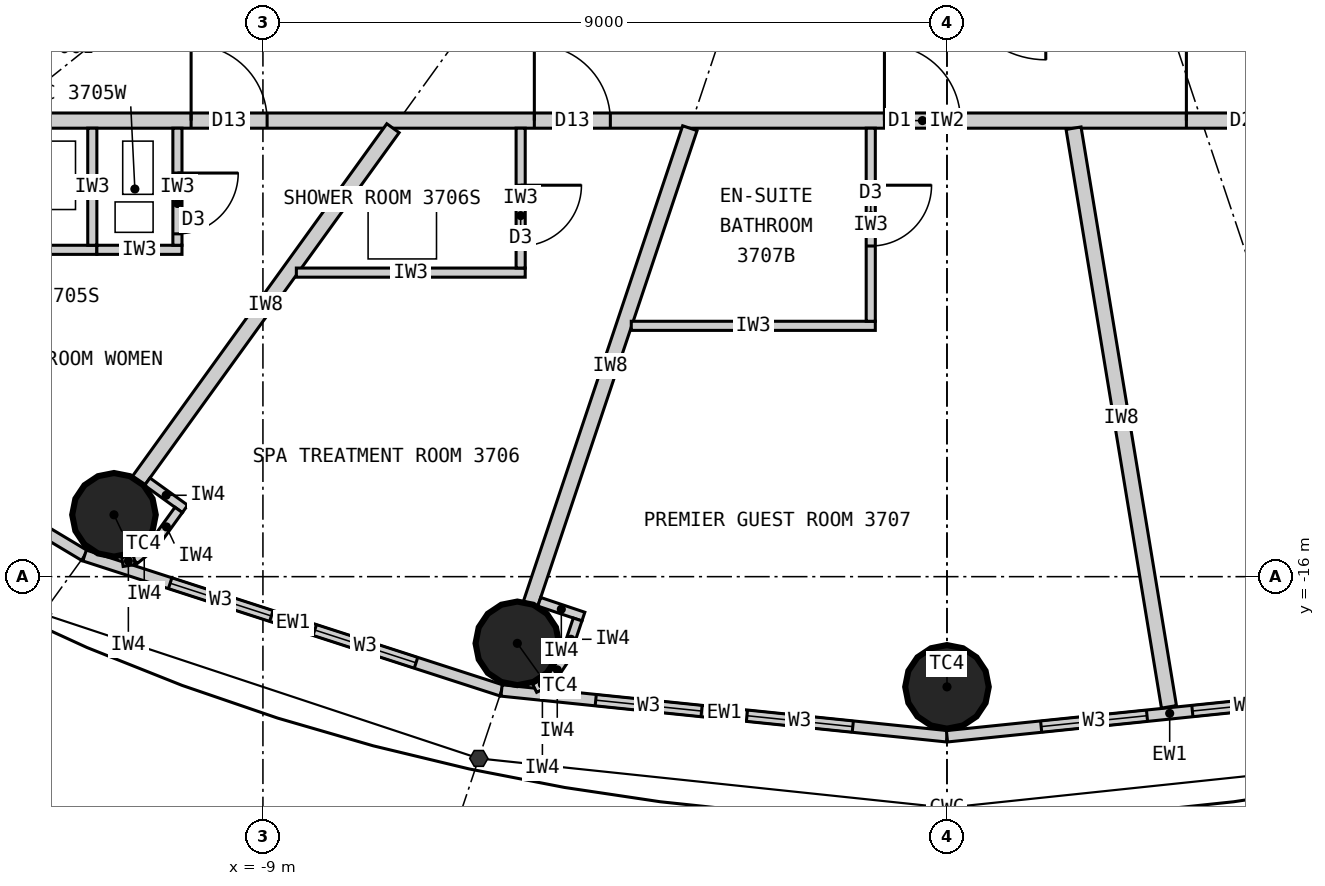
"""IFC4 building model, lengths in metres.
Left out: names, types, materials, properties, quantities, classifications, styles, units other than length and angle.
Written with IfcOpenShell. Run it as: python <this file> out.ifc"""

import sys

from ifc_helpers import new_model, si_unit, direction, frame, frame_2d, origin, origin_2d, place, context, subcontext, project, spatial, rectangle, circle, extrude, element, fill, save


model = new_model("IFC4")
c1 = context("Model", 3, precision=1e-05, world=origin(), true_north=direction((0.0, 1.0)))
c2 = subcontext(c1, "Body", "Model", "MODEL_VIEW")
j1 = project(units=[si_unit("LENGTHUNIT", "METRE"), si_unit("PLANEANGLEUNIT", "RADIAN")], contexts=[c1])
p1 = place(None, origin())
s1 = spatial("IfcSite", under=j1, at=p1, CompositionType="ELEMENT")
p2 = place(p1, origin())
s2 = spatial("IfcBuilding", under=s1, at=p2, CompositionType="ELEMENT")
p3 = place(p2, frame((0.0, 0.0, 143.4)))
s3 = spatial("IfcBuildingStorey", under=s2, at=p3, CompositionType="ELEMENT", Elevation=143.4)
for number, where, z_axis, x_axis in (
    (1, (-10.96, -15.186, 0.0), (0.0, 0.0, 1.0), (1.0, 0.0, 0.0)),
    (2, (-5.653, -16.877, 0.0), (0.0, 0.0, 1.0), (1.0, 0.0, 0.0)),
    (3, (0.0, -17.45, 0.0), (0.0, 0.0, 1.0), (1.0, 0.0, 0.0)),
):
    element("IfcColumn", number, at=place(p3, frame(where, z_axis=z_axis, x_axis=x_axis)), inside=s3, PredefinedType="COLUMN", context=c2, shape_type="SweptSolid", body=[
        extrude(circle(Radius=0.55, at=origin_2d()), origin(), (0.0, 0.0, 1.0), 3.3),
    ])
p4 = place(p3, frame((-16.095, -12.876, 0.0), z_axis=(0.0, 0.0, 1.0), x_axis=(0.857695199231, -0.514158482587, 0.0)))
e4 = element("IfcWall", 4, at=p4, inside=s3, PredefinedType="ELEMENTEDWALL", context=c2, shape_type="SweptSolid", body=[
    extrude(rectangle(XDim=5.536, YDim=0.15, at=frame_2d((2.768, 0.0))), origin(), (0.0, 0.0, 1.0), 3.12),
])
p5 = place(p4, frame((1.068, 0.0, 0.9)))
e5 = element("IfcOpeningElement", 5, at=p5, cuts=e4, PredefinedType="OPENING", context=c2, shape_type="SweptSolid", body=[
    extrude(rectangle(XDim=1.4, YDim=1.9, at=frame_2d((0.7, 0.95))), frame((0.0, 0.085, 0.0), z_axis=(0.0, -1.0, 0.0), x_axis=(1.0, 0.0, 0.0)), (0.0, 0.0, 1.0), 0.17),
])
p6 = place(p4, frame((3.068, 0.0, 0.9)))
e6 = element("IfcOpeningElement", 6, at=p6, cuts=e4, PredefinedType="OPENING", context=c2, shape_type="SweptSolid", body=[
    extrude(rectangle(XDim=1.4, YDim=1.9, at=frame_2d((0.7, 0.95))), frame((0.0, 0.085, 0.0), z_axis=(0.0, -1.0, 0.0), x_axis=(1.0, 0.0, 0.0)), (0.0, 0.0, 1.0), 0.17),
])
p7 = place(p3, frame((-11.346, -15.722, 0.0), z_axis=(0.0, 0.0, 1.0), x_axis=(0.951432482129, -0.307857486429, 0.0)))
e7 = element("IfcWall", 7, at=p7, inside=s3, PredefinedType="ELEMENTEDWALL", context=c2, shape_type="SweptSolid", body=[
    extrude(rectangle(XDim=5.766, YDim=0.15, at=frame_2d((2.883, 0.0))), origin(), (0.0, 0.0, 1.0), 3.12),
])
p8 = place(p7, frame((1.183, 0.0, 0.9)))
e8 = element("IfcOpeningElement", 8, at=p8, cuts=e7, PredefinedType="OPENING", context=c2, shape_type="SweptSolid", body=[
    extrude(rectangle(XDim=1.4, YDim=1.9, at=frame_2d((0.7, 0.95))), frame((0.0, 0.085, 0.0), z_axis=(0.0, -1.0, 0.0), x_axis=(1.0, 0.0, 0.0)), (0.0, 0.0, 1.0), 0.17),
])
p9 = place(p7, frame((3.183, 0.0, 0.9)))
e9 = element("IfcOpeningElement", 9, at=p9, cuts=e7, PredefinedType="OPENING", context=c2, shape_type="SweptSolid", body=[
    extrude(rectangle(XDim=1.4, YDim=1.9, at=frame_2d((0.7, 0.95))), frame((0.0, 0.085, 0.0), z_axis=(0.0, -1.0, 0.0), x_axis=(1.0, 0.0, 0.0)), (0.0, 0.0, 1.0), 0.17),
])
p10 = place(p3, frame((-5.86, -17.497, 0.0), z_axis=(0.0, 0.0, 1.0), x_axis=(0.994751738032, -0.102318032045, 0.0)))
e10 = element("IfcWall", 10, at=p10, inside=s3, PredefinedType="ELEMENTEDWALL", context=c2, shape_type="SweptSolid", body=[
    extrude(rectangle(XDim=5.891, YDim=0.15, at=frame_2d((2.946, 0.0))), origin(), (0.0, 0.0, 1.0), 3.12),
])
p11 = place(p10, frame((1.246, 0.0, 0.9)))
e11 = element("IfcOpeningElement", 11, at=p11, cuts=e10, PredefinedType="OPENING", context=c2, shape_type="SweptSolid", body=[
    extrude(rectangle(XDim=1.4, YDim=1.9, at=frame_2d((0.7, 0.95))), frame((0.0, 0.085, 0.0), z_axis=(0.0, -1.0, 0.0), x_axis=(1.0, 0.0, 0.0)), (0.0, 0.0, 1.0), 0.17),
])
p12 = place(p10, frame((3.246, 0.0, 0.9)))
e12 = element("IfcOpeningElement", 12, at=p12, cuts=e10, PredefinedType="OPENING", context=c2, shape_type="SweptSolid", body=[
    extrude(rectangle(XDim=1.4, YDim=1.9, at=frame_2d((0.7, 0.95))), frame((0.0, 0.085, 0.0), z_axis=(0.0, -1.0, 0.0), x_axis=(1.0, 0.0, 0.0)), (0.0, 0.0, 1.0), 0.17),
])
p13 = place(p3, frame((0.0, -18.1, 0.0), z_axis=(0.0, 0.0, 1.0), x_axis=(0.994751738032, 0.102318032045, 0.0)))
e13 = element("IfcWall", 13, at=p13, inside=s3, PredefinedType="ELEMENTEDWALL", context=c2, shape_type="SweptSolid", body=[
    extrude(rectangle(XDim=5.891, YDim=0.15, at=frame_2d((2.946, 0.0))), origin(), (0.0, 0.0, 1.0), 3.12),
])
p14 = place(p13, frame((1.246, 0.0, 0.9)))
e14 = element("IfcOpeningElement", 14, at=p14, cuts=e13, PredefinedType="OPENING", context=c2, shape_type="SweptSolid", body=[
    extrude(rectangle(XDim=1.4, YDim=1.9, at=frame_2d((0.7, 0.95))), frame((0.0, 0.085, 0.0), z_axis=(0.0, -1.0, 0.0), x_axis=(1.0, 0.0, 0.0)), (0.0, 0.0, 1.0), 0.17),
])
p15 = place(p13, frame((3.246, 0.0, 0.9)))
e15 = element("IfcOpeningElement", 15, at=p15, cuts=e13, PredefinedType="OPENING", context=c2, shape_type="SweptSolid", body=[
    extrude(rectangle(XDim=1.4, YDim=1.9, at=frame_2d((0.7, 0.95))), frame((0.0, 0.085, 0.0), z_axis=(0.0, -1.0, 0.0), x_axis=(1.0, 0.0, 0.0)), (0.0, 0.0, 1.0), 0.17),
])
p16 = place(p3, frame((14.1, -10.0, 0.0), z_axis=(0.0, 0.0, 1.0), x_axis=(-1.0, 0.0, 0.0)))
e16 = element("IfcWall", 16, at=p16, inside=s3, PredefinedType="PARTITIONING", context=c2, shape_type="SweptSolid", body=[
    extrude(rectangle(XDim=28.2, YDim=0.2, at=frame_2d((14.1, 0.0))), origin(), (0.0, 0.0, 1.0), 3.12),
])
p17 = place(p16, frame((23.045, 0.0, 0.0)))
e17 = element("IfcOpeningElement", 17, at=p17, cuts=e16, PredefinedType="OPENING", context=c2, shape_type="SweptSolid", body=[
    extrude(rectangle(XDim=1.0, YDim=2.2, at=frame_2d((0.5, 1.1))), frame((0.0, 0.11, 0.0), z_axis=(0.0, -1.0, 0.0), x_axis=(1.0, 0.0, 0.0)), (0.0, 0.0, 1.0), 0.22),
])
p18 = place(p16, frame((18.529, 0.0, 0.0)))
e18 = element("IfcOpeningElement", 18, at=p18, cuts=e16, PredefinedType="OPENING", context=c2, shape_type="SweptSolid", body=[
    extrude(rectangle(XDim=1.0, YDim=2.2, at=frame_2d((0.5, 1.1))), frame((0.0, 0.11, 0.0), z_axis=(0.0, -1.0, 0.0), x_axis=(1.0, 0.0, 0.0)), (0.0, 0.0, 1.0), 0.22),
])
p19 = place(p16, frame((13.923, 0.0, 0.0)))
e19 = element("IfcOpeningElement", 19, at=p19, cuts=e16, PredefinedType="OPENING", context=c2, shape_type="SweptSolid", body=[
    extrude(rectangle(XDim=1.0, YDim=2.2, at=frame_2d((0.5, 1.1))), frame((0.0, 0.11, 0.0), z_axis=(0.0, -1.0, 0.0), x_axis=(1.0, 0.0, 0.0)), (0.0, 0.0, 1.0), 0.22),
])
p20 = place(p16, frame((9.35, 0.0, 0.0)))
e20 = element("IfcOpeningElement", 20, at=p20, cuts=e16, PredefinedType="OPENING", context=c2, shape_type="SweptSolid", body=[
    extrude(rectangle(XDim=1.6, YDim=2.4, at=frame_2d((0.8, 1.2))), frame((0.0, 0.11, 0.0), z_axis=(0.0, -1.0, 0.0), x_axis=(1.0, 0.0, 0.0)), (0.0, 0.0, 1.0), 0.22),
])
p21 = place(p3, frame((-7.289, -10.1, 0.0), z_axis=(0.0, 0.0, 1.0), x_axis=(-0.585222595178, -0.810872686735, 0.0)))
e21 = element("IfcWall", 21, at=p21, inside=s3, PredefinedType="PARTITIONING", context=c2, shape_type="SweptSolid", body=[
    extrude(rectangle(XDim=5.722, YDim=0.2, at=frame_2d((2.861, 0.0))), origin(), (0.0, 0.0, 1.0), 2.27),
])
p22 = place(p3, frame((-3.383, -10.1, 0.0), z_axis=(0.0, 0.0, 1.0), x_axis=(-0.317615120474, -0.948219718866, 0.0)))
e22 = element("IfcWall", 22, at=p22, inside=s3, PredefinedType="PARTITIONING", context=c2, shape_type="SweptSolid", body=[
    extrude(rectangle(XDim=6.597, YDim=0.2, at=frame_2d((3.299, 0.0))), origin(), (0.0, 0.0, 1.0), 2.27),
])
p23 = place(p3, frame((1.666, -10.1, 0.0), z_axis=(0.0, 0.0, 1.0), x_axis=(0.162669562982, -0.986680603478, 0.0)))
e23 = element("IfcWall", 23, at=p23, inside=s3, PredefinedType="PARTITIONING", context=c2, shape_type="SweptSolid", body=[
    extrude(rectangle(XDim=7.716, YDim=0.2, at=frame_2d((3.858, 0.0))), origin(), (0.0, 0.0, 1.0), 3.12),
])
p24 = place(p3, frame((-14.525, -11.7, 0.0), z_axis=(0.0, 0.0, 1.0), x_axis=(1.0, 0.0, 0.0)))
e24 = element("IfcWall", 24, at=p24, inside=s3, PredefinedType="PARTITIONING", context=c2, shape_type="SweptSolid", body=[
    extrude(rectangle(XDim=3.34, YDim=0.12, at=frame_2d((1.67, 0.0))), origin(), (0.0, 0.0, 1.0), 3.12),
])
p25 = place(p24, frame((1.27, 0.0, 0.0)))
e25 = element("IfcOpeningElement", 25, at=p25, cuts=e24, PredefinedType="OPENING", context=c2, shape_type="SweptSolid", body=[
    extrude(rectangle(XDim=0.8, YDim=2.1, at=frame_2d((0.4, 1.05))), frame((0.0, 0.07, 0.0), z_axis=(0.0, -1.0, 0.0), x_axis=(1.0, 0.0, 0.0)), (0.0, 0.0, 1.0), 0.14),
])
p26 = place(p3, frame((-11.245, -10.1, 0.0), z_axis=(0.0, 0.0, 1.0), x_axis=(0.0, -1.0, 0.0)))
e26 = element("IfcWall", 26, at=p26, inside=s3, PredefinedType="PARTITIONING", context=c2, shape_type="SweptSolid", body=[
    extrude(rectangle(XDim=1.54, YDim=0.12, at=frame_2d((0.77, 0.0))), origin(), (0.0, 0.0, 1.0), 3.12),
])
p27 = place(p3, frame((-11.185, -11.7, 0.0), z_axis=(0.0, 0.0, 1.0), x_axis=(1.0, 0.0, 0.0)))
e27 = element("IfcWall", 27, at=p27, inside=s3, PredefinedType="PARTITIONING", context=c2, shape_type="SweptSolid", body=[
    extrude(rectangle(XDim=1.12, YDim=0.12, at=frame_2d((0.56, 0.0))), origin(), (0.0, 0.0, 1.0), 3.12),
])
p28 = place(p3, frame((-10.125, -10.1, 0.0), z_axis=(0.0, 0.0, 1.0), x_axis=(0.0, -1.0, 0.0)))
e28 = element("IfcWall", 28, at=p28, inside=s3, PredefinedType="PARTITIONING", context=c2, shape_type="SweptSolid", body=[
    extrude(rectangle(XDim=1.54, YDim=0.12, at=frame_2d((0.77, 0.0))), origin(), (0.0, 0.0, 1.0), 3.12),
])
p29 = place(p28, frame((0.59, 0.0, 0.0)))
e29 = element("IfcOpeningElement", 29, at=p29, cuts=e28, PredefinedType="OPENING", context=c2, shape_type="SweptSolid", body=[
    extrude(rectangle(XDim=0.8, YDim=2.1, at=frame_2d((0.4, 1.05))), frame((0.0, 0.07, 0.0), z_axis=(0.0, -1.0, 0.0), x_axis=(1.0, 0.0, 0.0)), (0.0, 0.0, 1.0), 0.14),
])
p30 = place(p3, frame((-8.56, -12.0, 0.0), z_axis=(0.0, 0.0, 1.0), x_axis=(1.0, 0.0, 0.0)))
e30 = element("IfcWall", 30, at=p30, inside=s3, PredefinedType="PARTITIONING", context=c2, shape_type="SweptSolid", body=[
    extrude(rectangle(XDim=3.011, YDim=0.12, at=frame_2d((1.506, 0.0))), origin(), (0.0, 0.0, 1.0), 3.12),
])
p31 = place(p3, frame((-5.609, -10.1, 0.0), z_axis=(0.0, 0.0, 1.0), x_axis=(0.0, -1.0, 0.0)))
e31 = element("IfcWall", 31, at=p31, inside=s3, PredefinedType="PARTITIONING", context=c2, shape_type="SweptSolid", body=[
    extrude(rectangle(XDim=1.84, YDim=0.12, at=frame_2d((0.92, 0.0))), origin(), (0.0, 0.0, 1.0), 3.12),
])
p32 = place(p31, frame((0.75, 0.0, 0.0)))
e32 = element("IfcOpeningElement", 32, at=p32, cuts=e31, PredefinedType="OPENING", context=c2, shape_type="SweptSolid", body=[
    extrude(rectangle(XDim=0.8, YDim=2.1, at=frame_2d((0.4, 1.05))), frame((0.0, 0.07, 0.0), z_axis=(0.0, -1.0, 0.0), x_axis=(1.0, 0.0, 0.0)), (0.0, 0.0, 1.0), 0.14),
])
p33 = place(p3, frame((-4.154, -12.7, 0.0), z_axis=(0.0, 0.0, 1.0), x_axis=(1.0, 0.0, 0.0)))
e33 = element("IfcWall", 33, at=p33, inside=s3, PredefinedType="PARTITIONING", context=c2, shape_type="SweptSolid", body=[
    extrude(rectangle(XDim=3.211, YDim=0.12, at=frame_2d((1.605, 0.0))), origin(), (0.0, 0.0, 1.0), 3.12),
])
p34 = place(p3, frame((-1.003, -10.1, 0.0), z_axis=(0.0, 0.0, 1.0), x_axis=(0.0, -1.0, 0.0)))
e34 = element("IfcWall", 34, at=p34, inside=s3, PredefinedType="PARTITIONING", context=c2, shape_type="SweptSolid", body=[
    extrude(rectangle(XDim=2.54, YDim=0.12, at=frame_2d((1.27, 0.0))), origin(), (0.0, 0.0, 1.0), 3.12),
])
p35 = place(p34, frame((0.75, 0.0, 0.0)))
e35 = element("IfcOpeningElement", 35, at=p35, cuts=e34, PredefinedType="OPENING", context=c2, shape_type="SweptSolid", body=[
    extrude(rectangle(XDim=0.8, YDim=2.1, at=frame_2d((0.4, 1.05))), frame((0.0, 0.07, 0.0), z_axis=(0.0, -1.0, 0.0), x_axis=(1.0, 0.0, 0.0)), (0.0, 0.0, 1.0), 0.14),
])
p36 = place(p3, frame((-10.522, -14.75, 0.0), z_axis=(0.0, 0.0, 1.0), x_axis=(0.811057588427, -0.584966313777, 0.0)))
e36 = element("IfcWall", 36, at=p36, inside=s3, PredefinedType="PARTITIONING", context=c2, shape_type="SweptSolid", body=[
    extrude(rectangle(XDim=0.612, YDim=0.12, at=frame_2d((0.306, 0.0))), origin(), (0.0, 0.0, 1.0), 3.12),
])
p37 = place(p3, frame((-10.109, -15.122, 0.0), z_axis=(0.0, 0.0, 1.0), x_axis=(-0.585344718358, -0.810784534072, 0.0)))
e37 = element("IfcWall", 37, at=p37, inside=s3, PredefinedType="PARTITIONING", context=c2, shape_type="SweptSolid", body=[
    extrude(rectangle(XDim=0.55, YDim=0.12, at=frame_2d((0.275, 0.0))), origin(), (0.0, 0.0, 1.0), 3.12),
])
p38 = place(p3, frame((-10.431, -15.568, 0.0), z_axis=(0.0, 0.0, 1.0), x_axis=(-0.77505137267, -0.631898227345, 0.0)))
e38 = element("IfcWall", 38, at=p38, inside=s3, PredefinedType="PARTITIONING", context=c2, shape_type="SweptSolid", body=[
    extrude(rectangle(XDim=0.338, YDim=0.12, at=frame_2d((0.169, 0.0))), origin(), (0.0, 0.0, 1.0), 3.12),
])
p39 = place(p3, frame((-10.693, -15.781, 0.0), z_axis=(0.0, 0.0, 1.0), x_axis=(-0.987256785332, -0.159135287777, 0.0)))
e39 = element("IfcWall", 39, at=p39, inside=s3, PredefinedType="PARTITIONING", context=c2, shape_type="SweptSolid", body=[
    extrude(rectangle(XDim=0.158, YDim=0.12, at=frame_2d((0.079, 0.0))), origin(), (0.0, 0.0, 1.0), 3.12),
])
p40 = place(p3, frame((-5.364, -16.331, 0.0), z_axis=(0.0, 0.0, 1.0), x_axis=(0.948283770087, -0.317423835572, 0.0)))
e40 = element("IfcWall", 40, at=p40, inside=s3, PredefinedType="PARTITIONING", context=c2, shape_type="SweptSolid", body=[
    extrude(rectangle(XDim=0.612, YDim=0.12, at=frame_2d((0.306, 0.0))), origin(), (0.0, 0.0, 1.0), 3.12),
])
p41 = place(p3, frame((-4.86, -16.563, 0.0), z_axis=(0.0, 0.0, 1.0), x_axis=(-0.317825321803, -0.948149284038, 0.0)))
e41 = element("IfcWall", 41, at=p41, inside=s3, PredefinedType="PARTITIONING", context=c2, shape_type="SweptSolid", body=[
    extrude(rectangle(XDim=0.55, YDim=0.12, at=frame_2d((0.275, 0.0))), origin(), (0.0, 0.0, 1.0), 3.12),
])
p42 = place(p3, frame((-5.034, -17.084, 0.0), z_axis=(0.0, 0.0, 1.0), x_axis=(-0.552362205726, -0.833604218851, 0.0)))
e42 = element("IfcWall", 42, at=p42, inside=s3, PredefinedType="PARTITIONING", context=c2, shape_type="SweptSolid", body=[
    extrude(rectangle(XDim=0.338, YDim=0.12, at=frame_2d((0.169, 0.0))), origin(), (0.0, 0.0, 1.0), 3.12),
])
p43 = place(p3, frame((-5.221, -17.366, 0.0), z_axis=(0.0, 0.0, 1.0), x_axis=(-0.895067896179, -0.445929883759, 0.0)))
e43 = element("IfcWall", 43, at=p43, inside=s3, PredefinedType="PARTITIONING", context=c2, shape_type="SweptSolid", body=[
    extrude(rectangle(XDim=0.228, YDim=0.12, at=frame_2d((0.114, 0.0))), origin(), (0.0, 0.0, 1.0), 3.12),
])
p44 = place(p8, origin())
e44 = element("IfcWindow", 44, at=p44, inside=s3, PartitioningType="SINGLE_PANEL", PredefinedType="WINDOW", context=c2, shape_type="SweptSolid", body=[
    extrude(rectangle(XDim=1.4, YDim=1.9, at=frame_2d((0.7, 0.95))), frame((0.0, 0.03, 0.0), z_axis=(0.0, -1.0, 0.0), x_axis=(1.0, 0.0, 0.0)), (0.0, 0.0, 1.0), 0.06),
])
fill(e8, e44)
p45 = place(p9, origin())
e45 = element("IfcWindow", 45, at=p45, inside=s3, PartitioningType="SINGLE_PANEL", PredefinedType="WINDOW", context=c2, shape_type="SweptSolid", body=[
    extrude(rectangle(XDim=1.4, YDim=1.9, at=frame_2d((0.7, 0.95))), frame((0.0, 0.03, 0.0), z_axis=(0.0, -1.0, 0.0), x_axis=(1.0, 0.0, 0.0)), (0.0, 0.0, 1.0), 0.06),
])
fill(e9, e45)
p46 = place(p11, origin())
e46 = element("IfcWindow", 46, at=p46, inside=s3, PartitioningType="SINGLE_PANEL", PredefinedType="WINDOW", context=c2, shape_type="SweptSolid", body=[
    extrude(rectangle(XDim=1.4, YDim=1.9, at=frame_2d((0.7, 0.95))), frame((0.0, 0.03, 0.0), z_axis=(0.0, -1.0, 0.0), x_axis=(1.0, 0.0, 0.0)), (0.0, 0.0, 1.0), 0.06),
])
fill(e11, e46)
p47 = place(p12, origin())
e47 = element("IfcWindow", 47, at=p47, inside=s3, PartitioningType="SINGLE_PANEL", PredefinedType="WINDOW", context=c2, shape_type="SweptSolid", body=[
    extrude(rectangle(XDim=1.4, YDim=1.9, at=frame_2d((0.7, 0.95))), frame((0.0, 0.03, 0.0), z_axis=(0.0, -1.0, 0.0), x_axis=(1.0, 0.0, 0.0)), (0.0, 0.0, 1.0), 0.06),
])
fill(e12, e47)
p48 = place(p14, origin())
e48 = element("IfcWindow", 48, at=p48, inside=s3, PartitioningType="SINGLE_PANEL", PredefinedType="WINDOW", context=c2, shape_type="SweptSolid", body=[
    extrude(rectangle(XDim=1.4, YDim=1.9, at=frame_2d((0.7, 0.95))), frame((0.0, 0.03, 0.0), z_axis=(0.0, -1.0, 0.0), x_axis=(1.0, 0.0, 0.0)), (0.0, 0.0, 1.0), 0.06),
])
fill(e14, e48)
p49 = place(p15, origin())
e49 = element("IfcWindow", 49, at=p49, inside=s3, PartitioningType="SINGLE_PANEL", PredefinedType="WINDOW", context=c2, shape_type="SweptSolid", body=[
    extrude(rectangle(XDim=1.4, YDim=1.9, at=frame_2d((0.7, 0.95))), frame((0.0, 0.03, 0.0), z_axis=(0.0, -1.0, 0.0), x_axis=(1.0, 0.0, 0.0)), (0.0, 0.0, 1.0), 0.06),
])
fill(e15, e49)
p50 = place(p29, origin())
e50 = element("IfcDoor", 50, at=p50, inside=s3, OperationType="SINGLE_SWING_LEFT", PredefinedType="DOOR", context=c2, shape_type="SweptSolid", body=[
    extrude(rectangle(XDim=0.8, YDim=2.1, at=frame_2d((0.4, 1.05))), frame((0.0, 0.025, 0.0), z_axis=(0.0, -1.0, 0.0), x_axis=(1.0, 0.0, 0.0)), (0.0, 0.0, 1.0), 0.05),
])
fill(e29, e50)
p51 = place(p17, origin())
e51 = element("IfcDoor", 51, at=p51, inside=s3, OperationType="SINGLE_SWING_RIGHT", PredefinedType="DOOR", context=c2, shape_type="SweptSolid", body=[
    extrude(rectangle(XDim=1.0, YDim=2.2, at=frame_2d((0.5, 1.1))), frame((0.0, 0.025, 0.0), z_axis=(0.0, -1.0, 0.0), x_axis=(1.0, 0.0, 0.0)), (0.0, 0.0, 1.0), 0.05),
])
fill(e17, e51)
p52 = place(p32, origin())
e52 = element("IfcDoor", 52, at=p52, inside=s3, OperationType="SINGLE_SWING_LEFT", PredefinedType="DOOR", context=c2, shape_type="SweptSolid", body=[
    extrude(rectangle(XDim=0.8, YDim=2.1, at=frame_2d((0.4, 1.05))), frame((0.0, 0.025, 0.0), z_axis=(0.0, -1.0, 0.0), x_axis=(1.0, 0.0, 0.0)), (0.0, 0.0, 1.0), 0.05),
])
fill(e32, e52)
p53 = place(p18, origin())
e53 = element("IfcDoor", 53, at=p53, inside=s3, OperationType="SINGLE_SWING_RIGHT", PredefinedType="DOOR", context=c2, shape_type="SweptSolid", body=[
    extrude(rectangle(XDim=1.0, YDim=2.2, at=frame_2d((0.5, 1.1))), frame((0.0, 0.025, 0.0), z_axis=(0.0, -1.0, 0.0), x_axis=(1.0, 0.0, 0.0)), (0.0, 0.0, 1.0), 0.05),
])
fill(e18, e53)
p54 = place(p35, origin())
e54 = element("IfcDoor", 54, at=p54, inside=s3, OperationType="SINGLE_SWING_LEFT", PredefinedType="DOOR", context=c2, shape_type="SweptSolid", body=[
    extrude(rectangle(XDim=0.8, YDim=2.1, at=frame_2d((0.4, 1.05))), frame((0.0, 0.025, 0.0), z_axis=(0.0, -1.0, 0.0), x_axis=(1.0, 0.0, 0.0)), (0.0, 0.0, 1.0), 0.05),
])
fill(e35, e54)
p55 = place(p19, origin())
e55 = element("IfcDoor", 55, at=p55, inside=s3, OperationType="SINGLE_SWING_RIGHT", PredefinedType="DOOR", context=c2, shape_type="SweptSolid", body=[
    extrude(rectangle(XDim=1.0, YDim=2.2, at=frame_2d((0.5, 1.1))), frame((0.0, 0.025, 0.0), z_axis=(0.0, -1.0, 0.0), x_axis=(1.0, 0.0, 0.0)), (0.0, 0.0, 1.0), 0.05),
])
fill(e19, e55)
p56 = place(p20, origin())
e56 = element("IfcDoor", 56, at=p56, inside=s3, OperationType="DOUBLE_DOOR_DOUBLE_SWING", PredefinedType="DOOR", context=c2, shape_type="SweptSolid", body=[
    extrude(rectangle(XDim=1.6, YDim=2.4, at=frame_2d((0.8, 1.2))), frame((0.0, 0.025, 0.0), z_axis=(0.0, -1.0, 0.0), x_axis=(1.0, 0.0, 0.0)), (0.0, 0.0, 1.0), 0.05),
])
fill(e20, e56)
save(model, sys.argv[1])
